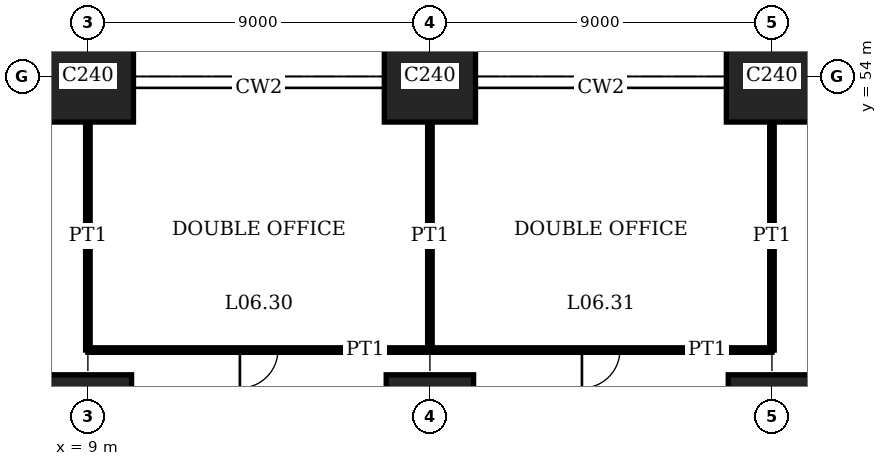
"""IFC4 building model, lengths in metres.
Left out: names, types, materials, properties, quantities, classifications, styles, units other than length and angle.
Written with IfcOpenShell. Run it as: python <this file> out.ifc"""

import sys

from ifc_helpers import new_model, si_unit, direction, frame, frame_2d, origin, origin_2d, place, context, subcontext, project, spatial, rectangle, extrude, element, fill, save


model = new_model("IFC4")
c1 = context("Model", 3, precision=1e-05, world=origin(), true_north=direction((0.0, 1.0)))
c2 = subcontext(c1, "Body", "Model", "MODEL_VIEW")
j1 = project(units=[si_unit("LENGTHUNIT", "METRE"), si_unit("PLANEANGLEUNIT", "RADIAN")], contexts=[c1])
p1 = place(None, origin())
s1 = spatial("IfcSite", under=j1, at=p1, CompositionType="ELEMENT")
p2 = place(p1, origin())
s2 = spatial("IfcBuilding", under=s1, at=p2, CompositionType="ELEMENT")
p3 = place(p2, frame((0.0, 0.0, 27.8)))
s3 = spatial("IfcBuildingStorey", under=s2, at=p3, CompositionType="ELEMENT", Elevation=27.8)
p4 = place(p3, frame((9.0, 45.0, 0.0), z_axis=(0.0, 0.0, 1.0), x_axis=(1.0, 0.0, 0.0)))
e1 = element("IfcColumn", 1, at=p4, inside=s3, PredefinedType="COLUMN", context=c2, shape_type="SweptSolid", body=[
    extrude(rectangle(XDim=2.3, YDim=2.3, at=origin_2d()), origin(), (0.0, 0.0, 1.0), 4.0),
])
p5 = place(p3, frame((9.0, 54.0, 0.0), z_axis=(0.0, 0.0, 1.0), x_axis=(1.0, 0.0, 0.0)))
e2 = element("IfcColumn", 2, at=p5, inside=s3, PredefinedType="COLUMN", context=c2, shape_type="SweptSolid", body=[
    extrude(rectangle(XDim=2.4, YDim=2.4, at=origin_2d()), origin(), (0.0, 0.0, 1.0), 4.0),
])
p6 = place(p3, frame((18.0, 45.0, 0.0), z_axis=(0.0, 0.0, 1.0), x_axis=(1.0, 0.0, 0.0)))
e3 = element("IfcColumn", 3, at=p6, inside=s3, PredefinedType="COLUMN", context=c2, shape_type="SweptSolid", body=[
    extrude(rectangle(XDim=2.3, YDim=2.3, at=origin_2d()), origin(), (0.0, 0.0, 1.0), 4.0),
])
p7 = place(p3, frame((18.0, 54.0, 0.0), z_axis=(0.0, 0.0, 1.0), x_axis=(1.0, 0.0, 0.0)))
e4 = element("IfcColumn", 4, at=p7, inside=s3, PredefinedType="COLUMN", context=c2, shape_type="SweptSolid", body=[
    extrude(rectangle(XDim=2.4, YDim=2.4, at=origin_2d()), origin(), (0.0, 0.0, 1.0), 4.0),
])
p8 = place(p3, frame((27.0, 45.0, 0.0), z_axis=(0.0, 0.0, 1.0), x_axis=(1.0, 0.0, 0.0)))
e5 = element("IfcColumn", 5, at=p8, inside=s3, PredefinedType="COLUMN", context=c2, shape_type="SweptSolid", body=[
    extrude(rectangle(XDim=2.3, YDim=2.3, at=origin_2d()), origin(), (0.0, 0.0, 1.0), 4.0),
])
p9 = place(p3, frame((27.0, 54.0, 0.0), z_axis=(0.0, 0.0, 1.0), x_axis=(1.0, 0.0, 0.0)))
e6 = element("IfcColumn", 6, at=p9, inside=s3, PredefinedType="COLUMN", context=c2, shape_type="SweptSolid", body=[
    extrude(rectangle(XDim=2.4, YDim=2.4, at=origin_2d()), origin(), (0.0, 0.0, 1.0), 4.0),
])
p10 = place(p3, frame((9.0, 46.8, 0.0), z_axis=(0.0, 0.0, 1.0), x_axis=(1.0, 0.0, 0.0)))
e7 = element("IfcWall", 7, at=p10, inside=s3, PredefinedType="PARTITIONING", context=c2, shape_type="SweptSolid", body=[
    extrude(rectangle(XDim=9.0, YDim=0.12, at=frame_2d((4.5, 0.0))), origin(), (0.0, 0.0, 1.0), 3.75),
])
p11 = place(p10, frame((4.0, 0.0, 0.0)))
e8 = element("IfcOpeningElement", 8, at=p11, cuts=e7, PredefinedType="OPENING", context=c2, shape_type="SweptSolid", body=[
    extrude(rectangle(XDim=1.0, YDim=2.4, at=frame_2d((0.5, 1.2))), frame((0.0, 0.07, 0.0), z_axis=(0.0, -1.0, 0.0), x_axis=(1.0, 0.0, 0.0)), (0.0, 0.0, 1.0), 0.14),
])
p12 = place(p3, frame((18.0, 46.8, 0.0), z_axis=(0.0, 0.0, 1.0), x_axis=(1.0, 0.0, 0.0)))
e9 = element("IfcWall", 9, at=p12, inside=s3, PredefinedType="PARTITIONING", context=c2, shape_type="SweptSolid", body=[
    extrude(rectangle(XDim=9.0, YDim=0.12, at=frame_2d((4.5, 0.0))), origin(), (0.0, 0.0, 1.0), 3.75),
])
p13 = place(p12, frame((4.0, 0.0, 0.0)))
e10 = element("IfcOpeningElement", 10, at=p13, cuts=e9, PredefinedType="OPENING", context=c2, shape_type="SweptSolid", body=[
    extrude(rectangle(XDim=1.0, YDim=2.4, at=frame_2d((0.5, 1.2))), frame((0.0, 0.07, 0.0), z_axis=(0.0, -1.0, 0.0), x_axis=(1.0, 0.0, 0.0)), (0.0, 0.0, 1.0), 0.14),
])
for number, where, z_axis, x_axis in (
    (11, (9.0, 46.8, 0.0), (0.0, 0.0, 1.0), (0.0, 1.0, 0.0)),
    (12, (18.0, 46.8, 0.0), (0.0, 0.0, 1.0), (0.0, 1.0, 0.0)),
    (13, (27.0, 46.8, 0.0), (0.0, 0.0, 1.0), (0.0, 1.0, 0.0)),
):
    element("IfcWall", number, at=place(p3, frame(where, z_axis=z_axis, x_axis=x_axis)), inside=s3, PredefinedType="PARTITIONING", context=c2, shape_type="SweptSolid", body=[
        extrude(rectangle(XDim=6.0, YDim=0.12, at=frame_2d((3.0, 0.0))), origin(), (0.0, 0.0, 1.0), 3.05),
    ])
p14 = place(p11, origin())
e14 = element("IfcDoor", 14, at=p14, inside=s3, OperationType="SINGLE_SWING_LEFT", PredefinedType="DOOR", context=c2, shape_type="SweptSolid", body=[
    extrude(rectangle(XDim=1.0, YDim=2.4, at=frame_2d((0.5, 1.2))), frame((0.0, 0.025, 0.0), z_axis=(0.0, -1.0, 0.0), x_axis=(1.0, 0.0, 0.0)), (0.0, 0.0, 1.0), 0.05),
])
fill(e8, e14)
p15 = place(p13, origin())
e15 = element("IfcDoor", 15, at=p15, inside=s3, OperationType="SINGLE_SWING_LEFT", PredefinedType="DOOR", context=c2, shape_type="SweptSolid", body=[
    extrude(rectangle(XDim=1.0, YDim=2.4, at=frame_2d((0.5, 1.2))), frame((0.0, 0.025, 0.0), z_axis=(0.0, -1.0, 0.0), x_axis=(1.0, 0.0, 0.0)), (0.0, 0.0, 1.0), 0.05),
])
fill(e10, e15)
save(model, sys.argv[1])
